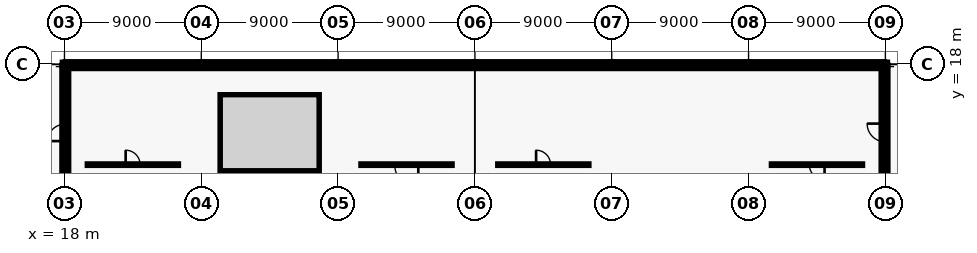
"""IFC4 building model, lengths in metres.
Left out: names, types, materials, properties, quantities, classifications, styles, units other than length and angle.
Written with IfcOpenShell. Run it as: python <this file> out.ifc"""

import sys

from ifc_helpers import new_model, si_unit, direction, frame, frame_2d, origin, origin_2d, place, context, subcontext, project, spatial, rectangle, i_section, extrude, element, fill, save


model = new_model("IFC4")
c1 = context("Model", 3, precision=1e-05, world=origin(), true_north=direction((0.0, 1.0)))
c2 = subcontext(c1, "Body", "Model", "MODEL_VIEW")
j1 = project(units=[si_unit("LENGTHUNIT", "METRE"), si_unit("PLANEANGLEUNIT", "RADIAN")], contexts=[c1])
p1 = place(None, origin())
s1 = spatial("IfcSite", under=j1, at=p1, CompositionType="ELEMENT")
p2 = place(p1, origin())
s2 = spatial("IfcBuilding", under=s1, at=p2, CompositionType="ELEMENT")
p3 = place(p2, frame((0.0, 0.0, 13.5)))
s3 = spatial("IfcBuildingStorey", under=s2, at=p3, CompositionType="ELEMENT", Elevation=13.5)
for number, where, z_axis, x_axis in (
    (1, (18.0, 18.0, 0.0), (0.0, 0.0, 1.0), (1.0, 0.0, 0.0)),
    (2, (27.0, 18.0, 0.0), (0.0, 0.0, 1.0), (1.0, 0.0, 0.0)),
    (3, (36.0, 18.0, 0.0), (0.0, 0.0, 1.0), (1.0, 0.0, 0.0)),
    (4, (45.0, 18.0, 0.0), (0.0, 0.0, 1.0), (1.0, 0.0, 0.0)),
    (5, (54.0, 18.0, 0.0), (0.0, 0.0, 1.0), (1.0, 0.0, 0.0)),
    (6, (63.0, 18.0, 0.0), (0.0, 0.0, 1.0), (1.0, 0.0, 0.0)),
    (7, (72.0, 18.0, 0.0), (0.0, 0.0, 1.0), (1.0, 0.0, 0.0)),
):
    element("IfcColumn", number, at=place(p3, frame(where, z_axis=z_axis, x_axis=x_axis)), inside=s3, PredefinedType="COLUMN", context=c2, shape_type="SweptSolid", body=[
        extrude(i_section(OverallWidth=0.28, OverallDepth=0.28, WebThickness=0.01, FlangeThickness=0.018, FilletRadius=0.024, at=origin_2d()), origin(), (0.0, 0.0, 1.0), 3.9),
    ])
p4 = place(p3, frame((18.06, 18.0, 0.0), z_axis=(0.0, 0.0, 1.0), x_axis=(1.0, 0.0, 0.0)))
e8 = element("IfcWall", 8, at=p4, inside=s3, PredefinedType="SOLIDWALL", context=c2, shape_type="SweptSolid", body=[
    extrude(rectangle(XDim=8.88, YDim=0.34, at=frame_2d((4.44, 0.0))), origin(), (0.0, 0.0, 1.0), 3.2),
])
p5 = place(p3, frame((27.06, 18.0, 0.0), z_axis=(0.0, 0.0, 1.0), x_axis=(1.0, 0.0, 0.0)))
e9 = element("IfcWall", 9, at=p5, inside=s3, PredefinedType="SOLIDWALL", context=c2, shape_type="SweptSolid", body=[
    extrude(rectangle(XDim=8.88, YDim=0.34, at=frame_2d((4.44, 0.0))), origin(), (0.0, 0.0, 1.0), 3.2),
])
p6 = place(p5, frame((1.186, 0.0, 0.9)))
e10 = element("IfcOpeningElement", 10, at=p6, cuts=e9, PredefinedType="OPENING", context=c2, shape_type="SweptSolid", body=[
    extrude(rectangle(XDim=2.6, YDim=1.4, at=frame_2d((1.3, 0.7))), frame((0.0, 0.18, 0.0), z_axis=(0.0, -1.0, 0.0), x_axis=(1.0, 0.0, 0.0)), (0.0, 0.0, 1.0), 0.36),
])
p7 = place(p5, frame((5.094, 0.0, 0.9)))
e11 = element("IfcOpeningElement", 11, at=p7, cuts=e9, PredefinedType="OPENING", context=c2, shape_type="SweptSolid", body=[
    extrude(rectangle(XDim=2.6, YDim=1.4, at=frame_2d((1.3, 0.7))), frame((0.0, 0.18, 0.0), z_axis=(0.0, -1.0, 0.0), x_axis=(1.0, 0.0, 0.0)), (0.0, 0.0, 1.0), 0.36),
])
p8 = place(p3, frame((36.06, 18.0, 0.0), z_axis=(0.0, 0.0, 1.0), x_axis=(1.0, 0.0, 0.0)))
e12 = element("IfcWall", 12, at=p8, inside=s3, PredefinedType="SOLIDWALL", context=c2, shape_type="SweptSolid", body=[
    extrude(rectangle(XDim=8.88, YDim=0.34, at=frame_2d((4.44, 0.0))), origin(), (0.0, 0.0, 1.0), 3.2),
])
p9 = place(p8, frame((1.486, 0.0, 0.9)))
e13 = element("IfcOpeningElement", 13, at=p9, cuts=e12, PredefinedType="OPENING", context=c2, shape_type="SweptSolid", body=[
    extrude(rectangle(XDim=2.0, YDim=1.5, at=frame_2d((1.0, 0.75))), frame((0.0, 0.18, 0.0), z_axis=(0.0, -1.0, 0.0), x_axis=(1.0, 0.0, 0.0)), (0.0, 0.0, 1.0), 0.36),
])
p10 = place(p8, frame((5.394, 0.0, 0.9)))
e14 = element("IfcOpeningElement", 14, at=p10, cuts=e12, PredefinedType="OPENING", context=c2, shape_type="SweptSolid", body=[
    extrude(rectangle(XDim=2.0, YDim=1.5, at=frame_2d((1.0, 0.75))), frame((0.0, 0.18, 0.0), z_axis=(0.0, -1.0, 0.0), x_axis=(1.0, 0.0, 0.0)), (0.0, 0.0, 1.0), 0.36),
])
p11 = place(p3, frame((45.06, 18.0, 0.0), z_axis=(0.0, 0.0, 1.0), x_axis=(1.0, 0.0, 0.0)))
e15 = element("IfcWall", 15, at=p11, inside=s3, PredefinedType="SOLIDWALL", context=c2, shape_type="SweptSolid", body=[
    extrude(rectangle(XDim=8.88, YDim=0.34, at=frame_2d((4.44, 0.0))), origin(), (0.0, 0.0, 1.0), 3.2),
])
p12 = place(p11, frame((1.186, 0.0, 0.9)))
e16 = element("IfcOpeningElement", 16, at=p12, cuts=e15, PredefinedType="OPENING", context=c2, shape_type="SweptSolid", body=[
    extrude(rectangle(XDim=2.6, YDim=1.4, at=frame_2d((1.3, 0.7))), frame((0.0, 0.18, 0.0), z_axis=(0.0, -1.0, 0.0), x_axis=(1.0, 0.0, 0.0)), (0.0, 0.0, 1.0), 0.36),
])
p13 = place(p11, frame((5.094, 0.0, 0.9)))
e17 = element("IfcOpeningElement", 17, at=p13, cuts=e15, PredefinedType="OPENING", context=c2, shape_type="SweptSolid", body=[
    extrude(rectangle(XDim=2.6, YDim=1.4, at=frame_2d((1.3, 0.7))), frame((0.0, 0.18, 0.0), z_axis=(0.0, -1.0, 0.0), x_axis=(1.0, 0.0, 0.0)), (0.0, 0.0, 1.0), 0.36),
])
p14 = place(p3, frame((54.06, 18.0, 0.0), z_axis=(0.0, 0.0, 1.0), x_axis=(1.0, 0.0, 0.0)))
e18 = element("IfcWall", 18, at=p14, inside=s3, PredefinedType="SOLIDWALL", context=c2, shape_type="SweptSolid", body=[
    extrude(rectangle(XDim=8.88, YDim=0.34, at=frame_2d((4.44, 0.0))), origin(), (0.0, 0.0, 1.0), 3.2),
])
p15 = place(p14, frame((1.486, 0.0, 0.9)))
e19 = element("IfcOpeningElement", 19, at=p15, cuts=e18, PredefinedType="OPENING", context=c2, shape_type="SweptSolid", body=[
    extrude(rectangle(XDim=2.0, YDim=1.5, at=frame_2d((1.0, 0.75))), frame((0.0, 0.18, 0.0), z_axis=(0.0, -1.0, 0.0), x_axis=(1.0, 0.0, 0.0)), (0.0, 0.0, 1.0), 0.36),
])
p16 = place(p14, frame((5.394, 0.0, 0.9)))
e20 = element("IfcOpeningElement", 20, at=p16, cuts=e18, PredefinedType="OPENING", context=c2, shape_type="SweptSolid", body=[
    extrude(rectangle(XDim=2.0, YDim=1.5, at=frame_2d((1.0, 0.75))), frame((0.0, 0.18, 0.0), z_axis=(0.0, -1.0, 0.0), x_axis=(1.0, 0.0, 0.0)), (0.0, 0.0, 1.0), 0.36),
])
p17 = place(p3, frame((63.06, 18.0, 0.0), z_axis=(0.0, 0.0, 1.0), x_axis=(1.0, 0.0, 0.0)))
e21 = element("IfcWall", 21, at=p17, inside=s3, PredefinedType="SOLIDWALL", context=c2, shape_type="SweptSolid", body=[
    extrude(rectangle(XDim=8.88, YDim=0.34, at=frame_2d((4.44, 0.0))), origin(), (0.0, 0.0, 1.0), 3.2),
])
p18 = place(p17, frame((1.186, 0.0, 0.9)))
e22 = element("IfcOpeningElement", 22, at=p18, cuts=e21, PredefinedType="OPENING", context=c2, shape_type="SweptSolid", body=[
    extrude(rectangle(XDim=2.6, YDim=1.4, at=frame_2d((1.3, 0.7))), frame((0.0, 0.18, 0.0), z_axis=(0.0, -1.0, 0.0), x_axis=(1.0, 0.0, 0.0)), (0.0, 0.0, 1.0), 0.36),
])
p19 = place(p17, frame((5.094, 0.0, 0.9)))
e23 = element("IfcOpeningElement", 23, at=p19, cuts=e21, PredefinedType="OPENING", context=c2, shape_type="SweptSolid", body=[
    extrude(rectangle(XDim=2.6, YDim=1.4, at=frame_2d((1.3, 0.7))), frame((0.0, 0.18, 0.0), z_axis=(0.0, -1.0, 0.0), x_axis=(1.0, 0.0, 0.0)), (0.0, 0.0, 1.0), 0.36),
])
p20 = place(p3, frame((18.0, 9.06, 0.0), z_axis=(0.0, 0.0, 1.0), x_axis=(0.0, 1.0, 0.0)))
e24 = element("IfcWall", 24, at=p20, inside=s3, PredefinedType="SOLIDWALL", context=c2, shape_type="SweptSolid", body=[
    extrude(rectangle(XDim=8.88, YDim=0.34, at=frame_2d((4.44, 0.0))), origin(), (0.0, 0.0, 1.0), 3.2),
])
p21 = place(p20, frame((3.89, 0.0, 0.0)))
e25 = element("IfcOpeningElement", 25, at=p21, cuts=e24, PredefinedType="OPENING", context=c2, shape_type="SweptSolid", body=[
    extrude(rectangle(XDim=1.1, YDim=2.15, at=frame_2d((0.55, 1.075))), frame((0.0, 0.18, 0.0), z_axis=(0.0, -1.0, 0.0), x_axis=(1.0, 0.0, 0.0)), (0.0, 0.0, 1.0), 0.36),
])
p22 = place(p3, frame((72.0, 9.06, 0.0), z_axis=(0.0, 0.0, 1.0), x_axis=(0.0, 1.0, 0.0)))
e26 = element("IfcWall", 26, at=p22, inside=s3, PredefinedType="SOLIDWALL", context=c2, shape_type="SweptSolid", body=[
    extrude(rectangle(XDim=8.88, YDim=0.34, at=frame_2d((4.44, 0.0))), origin(), (0.0, 0.0, 1.0), 3.2),
])
p23 = place(p22, frame((3.84, 0.0, 0.0)))
e27 = element("IfcOpeningElement", 27, at=p23, cuts=e26, PredefinedType="OPENING", context=c2, shape_type="SweptSolid", body=[
    extrude(rectangle(XDim=1.2, YDim=2.15, at=frame_2d((0.6, 1.075))), frame((0.0, 0.18, 0.0), z_axis=(0.0, -1.0, 0.0), x_axis=(1.0, 0.0, 0.0)), (0.0, 0.0, 1.0), 0.36),
])
p24 = place(p3, frame((18.14, 17.86, 3.9), z_axis=(0.0, 0.0, 1.0), x_axis=(1.0, 0.0, 0.0)))
e28 = element("IfcWall", 28, at=p24, inside=s3, PredefinedType="PARAPET", context=c2, shape_type="SweptSolid", body=[
    extrude(rectangle(XDim=53.72, YDim=0.28, at=frame_2d((26.86, 0.0))), origin(), (0.0, 0.0, 1.0), 1.2),
])
for number, where, z_axis, x_axis in (
    (29, (18.14, 0.14, 3.9), (0.0, 0.0, 1.0), (0.0, 1.0, 0.0)),
    (30, (71.86, 0.14, 3.9), (0.0, 0.0, 1.0), (0.0, 1.0, 0.0)),
):
    element("IfcWall", number, at=place(p3, frame(where, z_axis=z_axis, x_axis=x_axis)), inside=s3, PredefinedType="PARAPET", context=c2, shape_type="SweptSolid", body=[
        extrude(rectangle(XDim=17.72, YDim=0.28, at=frame_2d((8.86, 0.0))), origin(), (0.0, 0.0, 1.0), 1.2),
    ])
p25 = place(p3, frame((19.5, 11.4, 0.0), z_axis=(0.0, 0.0, 1.0), x_axis=(1.0, 0.0, 0.0)))
e31 = element("IfcWall", 31, at=p25, inside=s3, PredefinedType="PARTITIONING", context=c2, shape_type="SweptSolid", body=[
    extrude(rectangle(XDim=6.0, YDim=0.1, at=frame_2d((3.0, 0.0))), origin(), (0.0, 0.0, 1.0), 2.9),
])
p26 = place(p25, frame((2.525, 0.0, 0.0)))
e32 = element("IfcOpeningElement", 32, at=p26, cuts=e31, PredefinedType="OPENING", context=c2, shape_type="SweptSolid", body=[
    extrude(rectangle(XDim=0.95, YDim=2.1, at=frame_2d((0.475, 1.05))), frame((0.0, 0.06, 0.0), z_axis=(0.0, -1.0, 0.0), x_axis=(1.0, 0.0, 0.0)), (0.0, 0.0, 1.0), 0.12),
])
p27 = place(p3, frame((37.5, 11.4, 0.0), z_axis=(0.0, 0.0, 1.0), x_axis=(1.0, 0.0, 0.0)))
e33 = element("IfcWall", 33, at=p27, inside=s3, PredefinedType="PARTITIONING", context=c2, shape_type="SweptSolid", body=[
    extrude(rectangle(XDim=6.0, YDim=0.1, at=frame_2d((3.0, 0.0))), origin(), (0.0, 0.0, 1.0), 2.9),
])
p28 = place(p27, frame((2.225, 0.0, 0.0)))
e34 = element("IfcOpeningElement", 34, at=p28, cuts=e33, PredefinedType="OPENING", context=c2, shape_type="SweptSolid", body=[
    extrude(rectangle(XDim=1.55, YDim=2.25, at=frame_2d((0.775, 1.125))), frame((0.0, 0.06, 0.0), z_axis=(0.0, -1.0, 0.0), x_axis=(1.0, 0.0, 0.0)), (0.0, 0.0, 1.0), 0.12),
])
p29 = place(p3, frame((46.5, 11.4, 0.0), z_axis=(0.0, 0.0, 1.0), x_axis=(1.0, 0.0, 0.0)))
e35 = element("IfcWall", 35, at=p29, inside=s3, PredefinedType="PARTITIONING", context=c2, shape_type="SweptSolid", body=[
    extrude(rectangle(XDim=6.0, YDim=0.1, at=frame_2d((3.0, 0.0))), origin(), (0.0, 0.0, 1.0), 2.9),
])
p30 = place(p29, frame((2.525, 0.0, 0.0)))
e36 = element("IfcOpeningElement", 36, at=p30, cuts=e35, PredefinedType="OPENING", context=c2, shape_type="SweptSolid", body=[
    extrude(rectangle(XDim=0.95, YDim=2.1, at=frame_2d((0.475, 1.05))), frame((0.0, 0.06, 0.0), z_axis=(0.0, -1.0, 0.0), x_axis=(1.0, 0.0, 0.0)), (0.0, 0.0, 1.0), 0.12),
])
p31 = place(p3, frame((64.5, 11.4, 0.0), z_axis=(0.0, 0.0, 1.0), x_axis=(1.0, 0.0, 0.0)))
e37 = element("IfcWall", 37, at=p31, inside=s3, PredefinedType="PARTITIONING", context=c2, shape_type="SweptSolid", body=[
    extrude(rectangle(XDim=6.0, YDim=0.1, at=frame_2d((3.0, 0.0))), origin(), (0.0, 0.0, 1.0), 2.9),
])
p32 = place(p31, frame((2.5, 0.0, 0.0)))
e38 = element("IfcOpeningElement", 38, at=p32, cuts=e37, PredefinedType="OPENING", context=c2, shape_type="SweptSolid", body=[
    extrude(rectangle(XDim=1.0, YDim=2.1, at=frame_2d((0.5, 1.05))), frame((0.0, 0.06, 0.0), z_axis=(0.0, -1.0, 0.0), x_axis=(1.0, 0.0, 0.0)), (0.0, 0.0, 1.0), 0.12),
])
p33 = place(p6, origin())
e39 = element("IfcWindow", 39, at=p33, inside=s3, PartitioningType="SINGLE_PANEL", PredefinedType="WINDOW", context=c2, shape_type="SweptSolid", body=[
    extrude(rectangle(XDim=2.6, YDim=1.4, at=frame_2d((1.3, 0.7))), frame((0.0, 0.03, 0.0), z_axis=(0.0, -1.0, 0.0), x_axis=(1.0, 0.0, 0.0)), (0.0, 0.0, 1.0), 0.06),
])
fill(e10, e39)
p34 = place(p7, origin())
e40 = element("IfcWindow", 40, at=p34, inside=s3, PartitioningType="SINGLE_PANEL", PredefinedType="WINDOW", context=c2, shape_type="SweptSolid", body=[
    extrude(rectangle(XDim=2.6, YDim=1.4, at=frame_2d((1.3, 0.7))), frame((0.0, 0.03, 0.0), z_axis=(0.0, -1.0, 0.0), x_axis=(1.0, 0.0, 0.0)), (0.0, 0.0, 1.0), 0.06),
])
fill(e11, e40)
p35 = place(p9, origin())
e41 = element("IfcWindow", 41, at=p35, inside=s3, PartitioningType="SINGLE_PANEL", PredefinedType="WINDOW", context=c2, shape_type="SweptSolid", body=[
    extrude(rectangle(XDim=2.0, YDim=1.5, at=frame_2d((1.0, 0.75))), frame((0.0, 0.03, 0.0), z_axis=(0.0, -1.0, 0.0), x_axis=(1.0, 0.0, 0.0)), (0.0, 0.0, 1.0), 0.06),
])
fill(e13, e41)
p36 = place(p10, origin())
e42 = element("IfcWindow", 42, at=p36, inside=s3, PartitioningType="SINGLE_PANEL", PredefinedType="WINDOW", context=c2, shape_type="SweptSolid", body=[
    extrude(rectangle(XDim=2.0, YDim=1.5, at=frame_2d((1.0, 0.75))), frame((0.0, 0.03, 0.0), z_axis=(0.0, -1.0, 0.0), x_axis=(1.0, 0.0, 0.0)), (0.0, 0.0, 1.0), 0.06),
])
fill(e14, e42)
p37 = place(p12, origin())
e43 = element("IfcWindow", 43, at=p37, inside=s3, PartitioningType="SINGLE_PANEL", PredefinedType="WINDOW", context=c2, shape_type="SweptSolid", body=[
    extrude(rectangle(XDim=2.6, YDim=1.4, at=frame_2d((1.3, 0.7))), frame((0.0, 0.03, 0.0), z_axis=(0.0, -1.0, 0.0), x_axis=(1.0, 0.0, 0.0)), (0.0, 0.0, 1.0), 0.06),
])
fill(e16, e43)
p38 = place(p13, origin())
e44 = element("IfcWindow", 44, at=p38, inside=s3, PartitioningType="SINGLE_PANEL", PredefinedType="WINDOW", context=c2, shape_type="SweptSolid", body=[
    extrude(rectangle(XDim=2.6, YDim=1.4, at=frame_2d((1.3, 0.7))), frame((0.0, 0.03, 0.0), z_axis=(0.0, -1.0, 0.0), x_axis=(1.0, 0.0, 0.0)), (0.0, 0.0, 1.0), 0.06),
])
fill(e17, e44)
p39 = place(p15, origin())
e45 = element("IfcWindow", 45, at=p39, inside=s3, PartitioningType="SINGLE_PANEL", PredefinedType="WINDOW", context=c2, shape_type="SweptSolid", body=[
    extrude(rectangle(XDim=2.0, YDim=1.5, at=frame_2d((1.0, 0.75))), frame((0.0, 0.03, 0.0), z_axis=(0.0, -1.0, 0.0), x_axis=(1.0, 0.0, 0.0)), (0.0, 0.0, 1.0), 0.06),
])
fill(e19, e45)
p40 = place(p16, origin())
e46 = element("IfcWindow", 46, at=p40, inside=s3, PartitioningType="SINGLE_PANEL", PredefinedType="WINDOW", context=c2, shape_type="SweptSolid", body=[
    extrude(rectangle(XDim=2.0, YDim=1.5, at=frame_2d((1.0, 0.75))), frame((0.0, 0.03, 0.0), z_axis=(0.0, -1.0, 0.0), x_axis=(1.0, 0.0, 0.0)), (0.0, 0.0, 1.0), 0.06),
])
fill(e20, e46)
p41 = place(p18, origin())
e47 = element("IfcWindow", 47, at=p41, inside=s3, PartitioningType="SINGLE_PANEL", PredefinedType="WINDOW", context=c2, shape_type="SweptSolid", body=[
    extrude(rectangle(XDim=2.6, YDim=1.4, at=frame_2d((1.3, 0.7))), frame((0.0, 0.03, 0.0), z_axis=(0.0, -1.0, 0.0), x_axis=(1.0, 0.0, 0.0)), (0.0, 0.0, 1.0), 0.06),
])
fill(e22, e47)
p42 = place(p19, origin())
e48 = element("IfcWindow", 48, at=p42, inside=s3, PartitioningType="SINGLE_PANEL", PredefinedType="WINDOW", context=c2, shape_type="SweptSolid", body=[
    extrude(rectangle(XDim=2.6, YDim=1.4, at=frame_2d((1.3, 0.7))), frame((0.0, 0.03, 0.0), z_axis=(0.0, -1.0, 0.0), x_axis=(1.0, 0.0, 0.0)), (0.0, 0.0, 1.0), 0.06),
])
fill(e23, e48)
p43 = place(p21, origin())
e49 = element("IfcDoor", 49, at=p43, inside=s3, OperationType="SINGLE_SWING_LEFT", PredefinedType="DOOR", context=c2, shape_type="SweptSolid", body=[
    extrude(rectangle(XDim=1.1, YDim=2.15, at=frame_2d((0.55, 1.075))), frame((0.0, 0.025, 0.0), z_axis=(0.0, -1.0, 0.0), x_axis=(1.0, 0.0, 0.0)), (0.0, 0.0, 1.0), 0.05),
])
fill(e25, e49)
p44 = place(p23, frame((1.2, 0.0, 0.0), z_axis=(0.0, 0.0, 1.0), x_axis=(-1.0, 0.0, 0.0)))
e50 = element("IfcDoor", 50, at=p44, inside=s3, OperationType="SINGLE_SWING_RIGHT", PredefinedType="DOOR", context=c2, shape_type="SweptSolid", body=[
    extrude(rectangle(XDim=1.2, YDim=2.15, at=frame_2d((0.6, 1.075))), frame((0.0, 0.025, 0.0), z_axis=(0.0, -1.0, 0.0), x_axis=(1.0, 0.0, 0.0)), (0.0, 0.0, 1.0), 0.05),
])
fill(e27, e50)
p45 = place(p26, origin())
e51 = element("IfcDoor", 51, at=p45, inside=s3, OperationType="SINGLE_SWING_LEFT", PredefinedType="DOOR", context=c2, shape_type="SweptSolid", body=[
    extrude(rectangle(XDim=0.95, YDim=2.1, at=frame_2d((0.475, 1.05))), frame((0.0, 0.025, 0.0), z_axis=(0.0, -1.0, 0.0), x_axis=(1.0, 0.0, 0.0)), (0.0, 0.0, 1.0), 0.05),
])
fill(e32, e51)
p46 = place(p28, origin())
e52 = element("IfcDoor", 52, at=p46, inside=s3, OperationType="SINGLE_SWING_RIGHT", PredefinedType="DOOR", context=c2, shape_type="SweptSolid", body=[
    extrude(rectangle(XDim=1.55, YDim=2.25, at=frame_2d((0.775, 1.125))), frame((0.0, 0.025, 0.0), z_axis=(0.0, -1.0, 0.0), x_axis=(1.0, 0.0, 0.0)), (0.0, 0.0, 1.0), 0.05),
])
fill(e34, e52)
p47 = place(p30, origin())
e53 = element("IfcDoor", 53, at=p47, inside=s3, OperationType="SINGLE_SWING_LEFT", PredefinedType="DOOR", context=c2, shape_type="SweptSolid", body=[
    extrude(rectangle(XDim=0.95, YDim=2.1, at=frame_2d((0.475, 1.05))), frame((0.0, 0.025, 0.0), z_axis=(0.0, -1.0, 0.0), x_axis=(1.0, 0.0, 0.0)), (0.0, 0.0, 1.0), 0.05),
])
fill(e36, e53)
p48 = place(p32, origin())
e54 = element("IfcDoor", 54, at=p48, inside=s3, OperationType="SINGLE_SWING_RIGHT", PredefinedType="DOOR", context=c2, shape_type="SweptSolid", body=[
    extrude(rectangle(XDim=1.0, YDim=2.1, at=frame_2d((0.5, 1.05))), frame((0.0, 0.025, 0.0), z_axis=(0.0, -1.0, 0.0), x_axis=(1.0, 0.0, 0.0)), (0.0, 0.0, 1.0), 0.05),
])
fill(e38, e54)
save(model, sys.argv[1])
